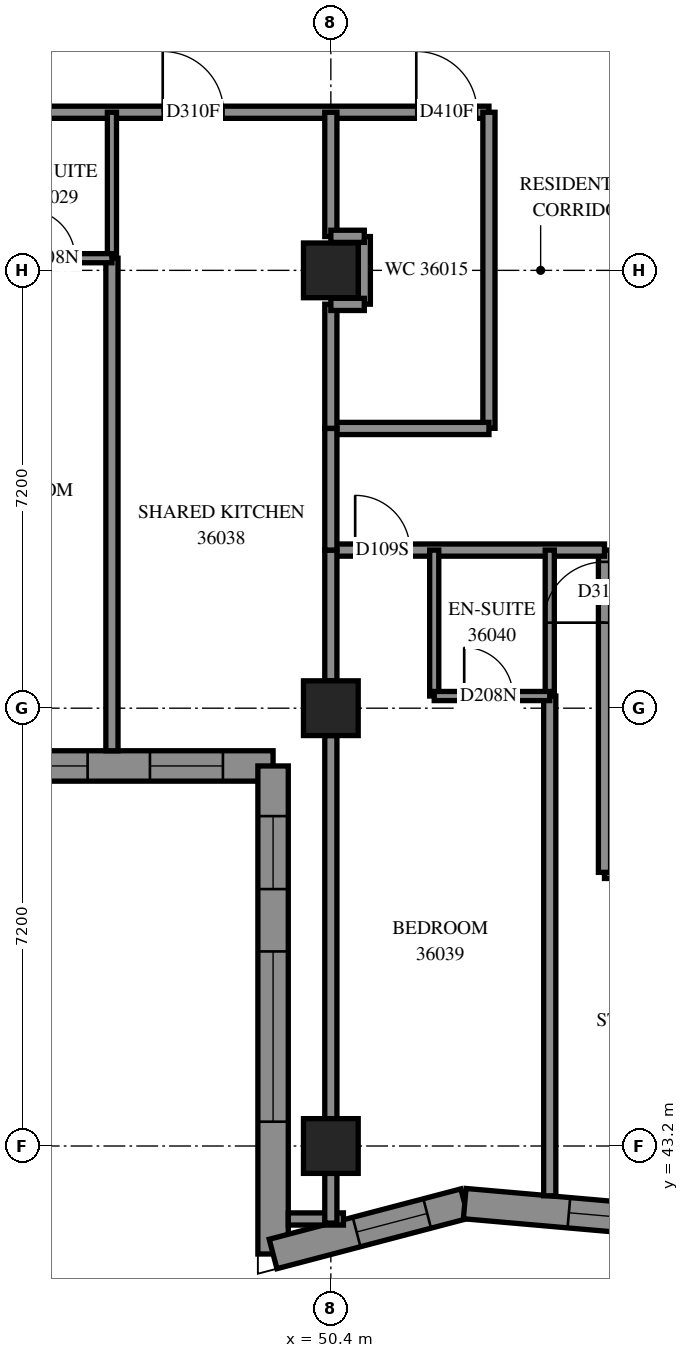
"""IFC4 building model, lengths in metres.
Left out: names, types, materials, properties, quantities, classifications, styles, units other than length and angle.
Written with IfcOpenShell. Run it as: python <this file> out.ifc"""

import sys

from ifc_helpers import new_model, si_unit, direction, frame, frame_2d, origin, origin_2d, place, context, subcontext, project, spatial, polyline, rectangle, outline, extrude, element, fill, save


model = new_model("IFC4")
c1 = context("Model", 3, precision=1e-05, world=origin(), true_north=direction((0.0, 1.0)))
c2 = subcontext(c1, "Body", "Model", "MODEL_VIEW")
j1 = project(units=[si_unit("LENGTHUNIT", "METRE"), si_unit("PLANEANGLEUNIT", "RADIAN")], contexts=[c1])
p1 = place(None, origin())
s1 = spatial("IfcSite", under=j1, at=p1, CompositionType="ELEMENT")
p2 = place(p1, origin())
s2 = spatial("IfcBuilding", under=s1, at=p2, CompositionType="ELEMENT")
p3 = place(p2, frame((0.0, 0.0, 135.4)))
s3 = spatial("IfcBuildingStorey", under=s2, at=p3, CompositionType="ELEMENT", Elevation=135.4)
for number, where, z_axis, x_axis in (
    (1, (50.4, 43.2, 0.0), (0.0, 0.0, 1.0), (1.0, 0.0, 0.0)),
    (2, (50.4, 50.4, 0.0), (0.0, 0.0, 1.0), (1.0, 0.0, 0.0)),
    (3, (50.4, 57.6, 0.0), (0.0, 0.0, 1.0), (1.0, 0.0, 0.0)),
):
    element("IfcColumn", number, at=place(p3, frame(where, z_axis=z_axis, x_axis=x_axis)), inside=s3, PredefinedType="COLUMN", context=c2, shape_type="SweptSolid", body=[
        extrude(rectangle(XDim=0.9, YDim=0.9, at=origin_2d()), origin(), (0.0, 0.0, 1.0), 3.1),
    ])
p4 = place(p3, frame((42.25, 49.45, 0.0), z_axis=(0.0, 0.0, 1.0), x_axis=(1.0, 0.0, 0.0)))
e4 = element("IfcWall", 4, at=p4, inside=s3, PredefinedType="SOLIDWALL", context=c2, shape_type="SweptSolid", body=[
    extrude(outline(polyline([(-0.25, -0.25), (6.95, -0.25), (7.45, 0.25), (0.25, 0.25), (-0.25, -0.25)])), origin(), (0.0, 0.0, 1.0), 3.1),
])
p5 = place(p4, frame((1.35, 0.0, 0.45)))
e5 = element("IfcOpeningElement", 5, at=p5, cuts=e4, PredefinedType="OPENING", context=c2, shape_type="SweptSolid", body=[
    extrude(rectangle(XDim=2.8, YDim=2.5, at=frame_2d((1.4, 1.25))), frame((0.0, 0.26, 0.0), z_axis=(0.0, -1.0, 0.0), x_axis=(1.0, 0.0, 0.0)), (0.0, 0.0, 1.0), 0.52),
])
p6 = place(p4, frame((5.175, 0.0, 0.45)))
e6 = element("IfcOpeningElement", 6, at=p6, cuts=e4, PredefinedType="OPENING", context=c2, shape_type="SweptSolid", body=[
    extrude(rectangle(XDim=1.2, YDim=2.5, at=frame_2d((0.6, 1.25))), frame((0.0, 0.26, 0.0), z_axis=(0.0, -1.0, 0.0), x_axis=(1.0, 0.0, 0.0)), (0.0, 0.0, 1.0), 0.52),
])
p7 = place(p3, frame((49.45, 49.45, 0.0), z_axis=(0.0, 0.0, 1.0), x_axis=(0.0, -1.0, 0.0)))
e7 = element("IfcWall", 7, at=p7, inside=s3, PredefinedType="SOLIDWALL", context=c2, shape_type="SweptSolid", body=[
    extrude(outline(polyline([(0.25, -0.25), (8.35, -0.25), (7.702, 0.25), (-0.25, 0.25), (0.25, -0.25)])), origin(), (0.0, 0.0, 1.0), 3.1),
])
p8 = place(p7, frame((3.05, 0.0, 0.45)))
e8 = element("IfcOpeningElement", 8, at=p8, cuts=e7, PredefinedType="OPENING", context=c2, shape_type="SweptSolid", body=[
    extrude(rectangle(XDim=2.8, YDim=2.5, at=frame_2d((1.4, 1.25))), frame((0.0, 0.26, 0.0), z_axis=(0.0, -1.0, 0.0), x_axis=(1.0, 0.0, 0.0)), (0.0, 0.0, 1.0), 0.52),
])
p9 = place(p7, frame((0.825, 0.0, 0.45)))
e9 = element("IfcOpeningElement", 9, at=p9, cuts=e7, PredefinedType="OPENING", context=c2, shape_type="SweptSolid", body=[
    extrude(rectangle(XDim=1.2, YDim=2.5, at=frame_2d((0.6, 1.25))), frame((0.0, 0.26, 0.0), z_axis=(0.0, -1.0, 0.0), x_axis=(1.0, 0.0, 0.0)), (0.0, 0.0, 1.0), 0.52),
])
p10 = place(p3, frame((49.45, 41.424, 0.0), z_axis=(0.0, 0.0, 1.0), x_axis=(0.9671285787, 0.2542878531, 0.0)))
e10 = element("IfcWall", 10, at=p10, inside=s3, PredefinedType="SOLIDWALL", context=c2, shape_type="SweptSolid", body=[
    extrude(outline(polyline([(-0.324, -0.25), (3.215, -0.25), (3.302, 0.25), (0.324, 0.25), (-0.324, -0.25)])), origin(), (0.0, 0.0, 1.0), 3.1),
])
p11 = place(p10, frame((1.42, 0.0, 0.45)))
e11 = element("IfcOpeningElement", 11, at=p11, cuts=e10, PredefinedType="OPENING", context=c2, shape_type="SweptSolid", body=[
    extrude(rectangle(XDim=1.2, YDim=2.5, at=frame_2d((0.6, 1.25))), frame((0.0, 0.26, 0.0), z_axis=(0.0, -1.0, 0.0), x_axis=(1.0, 0.0, 0.0)), (0.0, 0.0, 1.0), 0.52),
])
p12 = place(p3, frame((52.601, 42.253, 0.0), z_axis=(0.0, 0.0, 1.0), x_axis=(0.9961832879, -0.0872860633, 0.0)))
e12 = element("IfcWall", 12, at=p12, inside=s3, PredefinedType="SOLIDWALL", context=c2, shape_type="SweptSolid", body=[
    extrude(outline(polyline([(0.043, -0.25), (3.479, -0.25), (3.436, 0.25), (-0.043, 0.25), (0.043, -0.25)])), origin(), (0.0, 0.0, 1.0), 3.1),
])
p13 = place(p12, frame((1.72, 0.0, 0.45)))
e13 = element("IfcOpeningElement", 13, at=p13, cuts=e12, PredefinedType="OPENING", context=c2, shape_type="SweptSolid", body=[
    extrude(rectangle(XDim=1.2, YDim=2.5, at=frame_2d((0.6, 1.25))), frame((0.0, 0.26, 0.0), z_axis=(0.0, -1.0, 0.0), x_axis=(1.0, 0.0, 0.0)), (0.0, 0.0, 1.0), 0.52),
])
p14 = place(p3, frame((54.9, 47.7, 0.0), z_axis=(0.0, 0.0, 1.0), x_axis=(1.0, 0.0, 0.0)))
e14 = element("IfcWall", 14, at=p14, inside=s3, PredefinedType="PARTITIONING", context=c2, shape_type="SweptSolid", body=[
    extrude(rectangle(XDim=19.326, YDim=0.2, at=frame_2d((9.663, 0.0))), origin(), (0.0, 0.0, 1.0), 3.1),
])
p15 = place(p14, frame((5.0, 0.0, 0.0)))
e15 = element("IfcOpeningElement", 15, at=p15, cuts=e14, PredefinedType="OPENING", context=c2, shape_type="SweptSolid", body=[
    extrude(rectangle(XDim=0.9, YDim=2.1, at=frame_2d((0.45, 1.05))), frame((0.0, 0.11, 0.0), z_axis=(0.0, -1.0, 0.0), x_axis=(1.0, 0.0, 0.0)), (0.0, 0.0, 1.0), 0.22),
])
p16 = place(p14, frame((12.2, 0.0, 0.0)))
e16 = element("IfcOpeningElement", 16, at=p16, cuts=e14, PredefinedType="OPENING", context=c2, shape_type="SweptSolid", body=[
    extrude(rectangle(XDim=0.9, YDim=2.1, at=frame_2d((0.45, 1.05))), frame((0.0, 0.11, 0.0), z_axis=(0.0, -1.0, 0.0), x_axis=(1.0, 0.0, 0.0)), (0.0, 0.0, 1.0), 0.22),
])
p17 = place(p14, frame((6.7, 0.0, 0.0)))
e17 = element("IfcOpeningElement", 17, at=p17, cuts=e14, PredefinedType="OPENING", context=c2, shape_type="SweptSolid", body=[
    extrude(rectangle(XDim=0.9, YDim=2.1, at=frame_2d((0.45, 1.05))), frame((0.0, 0.11, 0.0), z_axis=(0.0, -1.0, 0.0), x_axis=(1.0, 0.0, 0.0)), (0.0, 0.0, 1.0), 0.22),
])
p18 = place(p14, frame((13.9, 0.0, 0.0)))
e18 = element("IfcOpeningElement", 18, at=p18, cuts=e14, PredefinedType="OPENING", context=c2, shape_type="SweptSolid", body=[
    extrude(rectangle(XDim=0.9, YDim=2.1, at=frame_2d((0.45, 1.05))), frame((0.0, 0.11, 0.0), z_axis=(0.0, -1.0, 0.0), x_axis=(1.0, 0.0, 0.0)), (0.0, 0.0, 1.0), 0.22),
])
p19 = place(p3, frame((36.0, 60.2, 0.0), z_axis=(0.0, 0.0, 1.0), x_axis=(1.0, 0.0, 0.0)))
e19 = element("IfcWall", 19, at=p19, inside=s3, PredefinedType="PARTITIONING", context=c2, shape_type="SweptSolid", body=[
    extrude(rectangle(XDim=17.0, YDim=0.2, at=frame_2d((8.5, 0.0))), origin(), (0.0, 0.0, 1.0), 3.1),
])
p20 = place(p19, frame((15.805, 0.0, 0.0)))
e20 = element("IfcOpeningElement", 20, at=p20, cuts=e19, PredefinedType="OPENING", context=c2, shape_type="SweptSolid", body=[
    extrude(rectangle(XDim=1.0, YDim=2.1, at=frame_2d((0.5, 1.05))), frame((0.0, 0.11, 0.0), z_axis=(0.0, -1.0, 0.0), x_axis=(1.0, 0.0, 0.0)), (0.0, 0.0, 1.0), 0.22),
])
p21 = place(p19, frame((4.125, 0.0, 0.0)))
e21 = element("IfcOpeningElement", 21, at=p21, cuts=e19, PredefinedType="OPENING", context=c2, shape_type="SweptSolid", body=[
    extrude(rectangle(XDim=1.0, YDim=2.1, at=frame_2d((0.5, 1.05))), frame((0.0, 0.11, 0.0), z_axis=(0.0, -1.0, 0.0), x_axis=(1.0, 0.0, 0.0)), (0.0, 0.0, 1.0), 0.22),
])
p22 = place(p19, frame((7.55, 0.0, 0.0)))
e22 = element("IfcOpeningElement", 22, at=p22, cuts=e19, PredefinedType="OPENING", context=c2, shape_type="SweptSolid", body=[
    extrude(rectangle(XDim=0.9, YDim=2.1, at=frame_2d((0.45, 1.05))), frame((0.0, 0.11, 0.0), z_axis=(0.0, -1.0, 0.0), x_axis=(1.0, 0.0, 0.0)), (0.0, 0.0, 1.0), 0.22),
])
p23 = place(p19, frame((11.635, 0.0, 0.0)))
e23 = element("IfcOpeningElement", 23, at=p23, cuts=e19, PredefinedType="OPENING", context=c2, shape_type="SweptSolid", body=[
    extrude(rectangle(XDim=1.0, YDim=2.1, at=frame_2d((0.5, 1.05))), frame((0.0, 0.11, 0.0), z_axis=(0.0, -1.0, 0.0), x_axis=(1.0, 0.0, 0.0)), (0.0, 0.0, 1.0), 0.22),
])
p24 = place(p3, frame((54.0, 42.381, 0.0), z_axis=(0.0, 0.0, 1.0), x_axis=(0.0, 1.0, 0.0)))
e24 = element("IfcWall", 24, at=p24, inside=s3, PredefinedType="PARTITIONING", context=c2, shape_type="SweptSolid", body=[
    extrude(rectangle(XDim=8.219, YDim=0.2, at=frame_2d((4.109, 0.0))), origin(), (0.0, 0.0, 1.0), 3.1),
])
p25 = place(p3, frame((46.8, 49.7, 0.0), z_axis=(0.0, 0.0, 1.0), x_axis=(0.0, 1.0, 0.0)))
e25 = element("IfcWall", 25, at=p25, inside=s3, PredefinedType="PARTITIONING", context=c2, shape_type="SweptSolid", body=[
    extrude(rectangle(XDim=8.1, YDim=0.2, at=frame_2d((4.05, 0.0))), origin(), (0.0, 0.0, 1.0), 3.1),
])
p26 = place(p3, frame((50.4, 43.65, 0.0), z_axis=(0.0, 0.0, 1.0), x_axis=(0.0, 1.0, 0.0)))
e26 = element("IfcWall", 26, at=p26, inside=s3, PredefinedType="PARTITIONING", context=c2, shape_type="SweptSolid", body=[
    extrude(rectangle(XDim=6.3, YDim=0.2, at=frame_2d((3.15, 0.0))), origin(), (0.0, 0.0, 1.0), 2.6),
])
p27 = place(p3, frame((54.9, 47.7, 0.0), z_axis=(0.0, 0.0, 1.0), x_axis=(0.0, 1.0, 0.0)))
e27 = element("IfcWall", 27, at=p27, inside=s3, PredefinedType="PARTITIONING", context=c2, shape_type="SweptSolid", body=[
    extrude(rectangle(XDim=5.3, YDim=0.2, at=frame_2d((2.65, 0.0))), origin(), (0.0, 0.0, 1.0), 3.1),
])
p28 = place(p27, frame((4.106, 0.0, 0.0)))
e28 = element("IfcOpeningElement", 28, at=p28, cuts=e27, PredefinedType="OPENING", context=c2, shape_type="SweptSolid", body=[
    extrude(rectangle(XDim=1.0, YDim=2.1, at=frame_2d((0.5, 1.05))), frame((0.0, 0.11, 0.0), z_axis=(0.0, -1.0, 0.0), x_axis=(1.0, 0.0, 0.0)), (0.0, 0.0, 1.0), 0.22),
])
p29 = place(p3, frame((53.0, 55.002, 0.0), z_axis=(0.0, 0.0, 1.0), x_axis=(0.0, 1.0, 0.0)))
e29 = element("IfcWall", 29, at=p29, inside=s3, PredefinedType="PARTITIONING", context=c2, shape_type="SweptSolid", body=[
    extrude(rectangle(XDim=5.198, YDim=0.2, at=frame_2d((2.599, 0.0))), origin(), (0.0, 0.0, 1.0), 3.1),
])
p30 = place(p3, frame((50.4, 53.0, 0.0), z_axis=(0.0, 0.0, 1.0), x_axis=(1.0, 0.0, 0.0)))
e30 = element("IfcWall", 30, at=p30, inside=s3, PredefinedType="PARTITIONING", context=c2, shape_type="SweptSolid", body=[
    extrude(rectangle(XDim=4.5, YDim=0.2, at=frame_2d((2.25, 0.0))), origin(), (0.0, 0.0, 1.0), 3.1),
])
p31 = place(p30, frame((0.4, 0.0, 0.0)))
e31 = element("IfcOpeningElement", 31, at=p31, cuts=e30, PredefinedType="OPENING", context=c2, shape_type="SweptSolid", body=[
    extrude(rectangle(XDim=0.9, YDim=2.1, at=frame_2d((0.45, 1.05))), frame((0.0, 0.11, 0.0), z_axis=(0.0, -1.0, 0.0), x_axis=(1.0, 0.0, 0.0)), (0.0, 0.0, 1.0), 0.22),
])
p32 = place(p3, frame((50.4, 55.0, 0.0), z_axis=(0.0, 0.0, 1.0), x_axis=(1.0, 0.0, 0.0)))
e32 = element("IfcWall", 32, at=p32, inside=s3, PredefinedType="PARTITIONING", context=c2, shape_type="SweptSolid", body=[
    extrude(rectangle(XDim=2.6, YDim=0.2, at=frame_2d((1.3, 0.0))), origin(), (0.0, 0.0, 1.0), 3.1),
])
for number, where, z_axis, x_axis in (
    (33, (46.8, 57.8, 0.0), (0.0, 0.0, 1.0), (0.0, 1.0, 0.0)),
    (34, (52.1, 50.6, 0.0), (0.0, 0.0, 1.0), (0.0, 1.0, 0.0)),
    (35, (54.0, 50.6, 0.0), (0.0, 0.0, 1.0), (0.0, 1.0, 0.0)),
):
    element("IfcWall", number, at=place(p3, frame(where, z_axis=z_axis, x_axis=x_axis)), inside=s3, PredefinedType="PARTITIONING", context=c2, shape_type="SweptSolid", body=[
        extrude(rectangle(XDim=2.4, YDim=0.15, at=frame_2d((1.2, 0.0))), origin(), (0.0, 0.0, 1.0), 3.1),
    ])
p33 = place(p3, frame((50.4, 50.85, 0.0), z_axis=(0.0, 0.0, 1.0), x_axis=(0.0, 1.0, 0.0)))
e36 = element("IfcWall", 36, at=p33, inside=s3, PredefinedType="PARTITIONING", context=c2, shape_type="SweptSolid", body=[
    extrude(rectangle(XDim=2.15, YDim=0.2, at=frame_2d((1.075, 0.0))), origin(), (0.0, 0.0, 1.0), 3.1),
])
for number, where, z_axis, x_axis in (
    (37, (50.4, 58.156, 0.0), (0.0, 0.0, 1.0), (0.0, 1.0, 0.0)),
    (38, (50.4, 55.0, 0.0), (0.0, 0.0, 1.0), (0.0, 1.0, 0.0)),
):
    element("IfcWall", number, at=place(p3, frame(where, z_axis=z_axis, x_axis=x_axis)), inside=s3, PredefinedType="PARTITIONING", context=c2, shape_type="SweptSolid", body=[
        extrude(rectangle(XDim=2.044, YDim=0.2, at=frame_2d((1.022, 0.0))), origin(), (0.0, 0.0, 1.0), 3.1),
    ])
p34 = place(p3, frame((50.4, 53.0, 0.0), z_axis=(0.0, 0.0, 1.0), x_axis=(0.0, 1.0, 0.0)))
e39 = element("IfcWall", 39, at=p34, inside=s3, PredefinedType="PARTITIONING", context=c2, shape_type="SweptSolid", body=[
    extrude(rectangle(XDim=2.0, YDim=0.2, at=frame_2d((1.0, 0.0))), origin(), (0.0, 0.0, 1.0), 3.1),
])
p35 = place(p3, frame((44.9, 57.8, 0.0), z_axis=(0.0, 0.0, 1.0), x_axis=(1.0, 0.0, 0.0)))
e40 = element("IfcWall", 40, at=p35, inside=s3, PredefinedType="PARTITIONING", context=c2, shape_type="SweptSolid", body=[
    extrude(rectangle(XDim=1.9, YDim=0.15, at=frame_2d((0.95, 0.0))), origin(), (0.0, 0.0, 1.0), 3.1),
])
p36 = place(p35, frame((0.493, 0.0, 0.0)))
e41 = element("IfcOpeningElement", 41, at=p36, cuts=e40, PredefinedType="OPENING", context=c2, shape_type="SweptSolid", body=[
    extrude(rectangle(XDim=0.8, YDim=2.1, at=frame_2d((0.4, 1.05))), frame((0.0, 0.085, 0.0), z_axis=(0.0, -1.0, 0.0), x_axis=(1.0, 0.0, 0.0)), (0.0, 0.0, 1.0), 0.17),
])
p37 = place(p3, frame((52.1, 50.6, 0.0), z_axis=(0.0, 0.0, 1.0), x_axis=(1.0, 0.0, 0.0)))
e42 = element("IfcWall", 42, at=p37, inside=s3, PredefinedType="PARTITIONING", context=c2, shape_type="SweptSolid", body=[
    extrude(rectangle(XDim=1.9, YDim=0.15, at=frame_2d((0.95, 0.0))), origin(), (0.0, 0.0, 1.0), 3.1),
])
p38 = place(p37, frame((0.493, 0.0, 0.0)))
e43 = element("IfcOpeningElement", 43, at=p38, cuts=e42, PredefinedType="OPENING", context=c2, shape_type="SweptSolid", body=[
    extrude(rectangle(XDim=0.8, YDim=2.1, at=frame_2d((0.4, 1.05))), frame((0.0, 0.085, 0.0), z_axis=(0.0, -1.0, 0.0), x_axis=(1.0, 0.0, 0.0)), (0.0, 0.0, 1.0), 0.17),
])
p39 = place(p3, frame((50.95, 57.044, 0.0), z_axis=(0.0, 0.0, 1.0), x_axis=(0.0, 1.0, 0.0)))
e44 = element("IfcWall", 44, at=p39, inside=s3, PredefinedType="PARTITIONING", context=c2, shape_type="SweptSolid", body=[
    extrude(rectangle(XDim=1.112, YDim=0.2, at=frame_2d((0.556, 0.0))), origin(), (0.0, 0.0, 1.0), 3.1),
])
p40 = place(p3, frame((49.7, 42.0, 0.0), z_axis=(0.0, 0.0, 1.0), x_axis=(1.0, 0.0, 0.0)))
e45 = element("IfcWall", 45, at=p40, inside=s3, PredefinedType="PARTITIONING", context=c2, shape_type="SweptSolid", body=[
    extrude(rectangle(XDim=0.907, YDim=0.2, at=frame_2d((0.453, 0.0))), origin(), (0.0, 0.0, 1.0), 3.1),
])
p41 = place(p3, frame((50.4, 41.932, 0.0), z_axis=(0.0, 0.0, 1.0), x_axis=(0.0, 1.0, 0.0)))
e46 = element("IfcWall", 46, at=p41, inside=s3, PredefinedType="PARTITIONING", context=c2, shape_type="SweptSolid", body=[
    extrude(rectangle(XDim=0.818, YDim=0.2, at=frame_2d((0.409, 0.0))), origin(), (0.0, 0.0, 1.0), 3.1),
])
for number, where, z_axis, x_axis in (
    (47, (50.4, 57.04, 0.0), (0.0, 0.0, 1.0), (1.0, 0.0, 0.0)),
    (48, (50.4, 58.16, 0.0), (0.0, 0.0, 1.0), (1.0, 0.0, 0.0)),
):
    element("IfcWall", number, at=place(p3, frame(where, z_axis=z_axis, x_axis=x_axis)), inside=s3, PredefinedType="PARTITIONING", context=c2, shape_type="SweptSolid", body=[
        extrude(rectangle(XDim=0.55, YDim=0.2, at=frame_2d((0.275, 0.0))), origin(), (0.0, 0.0, 1.0), 3.1),
    ])
p42 = place(p5, origin())
e49 = element("IfcWindow", 49, at=p42, inside=s3, PartitioningType="SINGLE_PANEL", PredefinedType="WINDOW", context=c2, shape_type="SweptSolid", body=[
    extrude(rectangle(XDim=2.8, YDim=2.5, at=frame_2d((1.4, 1.25))), frame((0.0, 0.18, 0.0), z_axis=(0.0, -1.0, 0.0), x_axis=(1.0, 0.0, 0.0)), (0.0, 0.0, 1.0), 0.06),
])
fill(e5, e49)
p43 = place(p6, origin())
e50 = element("IfcWindow", 50, at=p43, inside=s3, PartitioningType="SINGLE_PANEL", PredefinedType="WINDOW", context=c2, shape_type="SweptSolid", body=[
    extrude(rectangle(XDim=1.2, YDim=2.5, at=frame_2d((0.6, 1.25))), frame((0.0, 0.18, 0.0), z_axis=(0.0, -1.0, 0.0), x_axis=(1.0, 0.0, 0.0)), (0.0, 0.0, 1.0), 0.06),
])
fill(e6, e50)
p44 = place(p8, origin())
e51 = element("IfcWindow", 51, at=p44, inside=s3, PartitioningType="SINGLE_PANEL", PredefinedType="WINDOW", context=c2, shape_type="SweptSolid", body=[
    extrude(rectangle(XDim=2.8, YDim=2.5, at=frame_2d((1.4, 1.25))), frame((0.0, 0.18, 0.0), z_axis=(0.0, -1.0, 0.0), x_axis=(1.0, 0.0, 0.0)), (0.0, 0.0, 1.0), 0.06),
])
fill(e8, e51)
p45 = place(p9, origin())
e52 = element("IfcWindow", 52, at=p45, inside=s3, PartitioningType="SINGLE_PANEL", PredefinedType="WINDOW", context=c2, shape_type="SweptSolid", body=[
    extrude(rectangle(XDim=1.2, YDim=2.5, at=frame_2d((0.6, 1.25))), frame((0.0, 0.18, 0.0), z_axis=(0.0, -1.0, 0.0), x_axis=(1.0, 0.0, 0.0)), (0.0, 0.0, 1.0), 0.06),
])
fill(e9, e52)
p46 = place(p11, origin())
e53 = element("IfcWindow", 53, at=p46, inside=s3, PartitioningType="SINGLE_PANEL", PredefinedType="WINDOW", context=c2, shape_type="SweptSolid", body=[
    extrude(rectangle(XDim=1.2, YDim=2.5, at=frame_2d((0.6, 1.25))), frame((0.0, 0.18, 0.0), z_axis=(0.0, -1.0, 0.0), x_axis=(1.0, 0.0, 0.0)), (0.0, 0.0, 1.0), 0.06),
])
fill(e11, e53)
p47 = place(p13, origin())
e54 = element("IfcWindow", 54, at=p47, inside=s3, PartitioningType="SINGLE_PANEL", PredefinedType="WINDOW", context=c2, shape_type="SweptSolid", body=[
    extrude(rectangle(XDim=1.2, YDim=2.5, at=frame_2d((0.6, 1.25))), frame((0.0, 0.18, 0.0), z_axis=(0.0, -1.0, 0.0), x_axis=(1.0, 0.0, 0.0)), (0.0, 0.0, 1.0), 0.06),
])
fill(e13, e54)
p48 = place(p20, origin())
e55 = element("IfcDoor", 55, at=p48, inside=s3, OperationType="SINGLE_SWING_LEFT", PredefinedType="DOOR", context=c2, shape_type="SweptSolid", body=[
    extrude(rectangle(XDim=1.0, YDim=2.1, at=frame_2d((0.5, 1.05))), frame((0.0, 0.025, 0.0), z_axis=(0.0, -1.0, 0.0), x_axis=(1.0, 0.0, 0.0)), (0.0, 0.0, 1.0), 0.05),
])
fill(e20, e55)
p49 = place(p36, origin())
e56 = element("IfcDoor", 56, at=p49, inside=s3, OperationType="SINGLE_SWING_RIGHT", PredefinedType="DOOR", context=c2, shape_type="SweptSolid", body=[
    extrude(rectangle(XDim=0.8, YDim=2.1, at=frame_2d((0.4, 1.05))), frame((0.0, 0.025, 0.0), z_axis=(0.0, -1.0, 0.0), x_axis=(1.0, 0.0, 0.0)), (0.0, 0.0, 1.0), 0.05),
])
fill(e41, e56)
p50 = place(p23, origin())
e57 = element("IfcDoor", 57, at=p50, inside=s3, OperationType="SINGLE_SWING_RIGHT", PredefinedType="DOOR", context=c2, shape_type="SweptSolid", body=[
    extrude(rectangle(XDim=1.0, YDim=2.1, at=frame_2d((0.5, 1.05))), frame((0.0, 0.025, 0.0), z_axis=(0.0, -1.0, 0.0), x_axis=(1.0, 0.0, 0.0)), (0.0, 0.0, 1.0), 0.05),
])
fill(e23, e57)
p51 = place(p31, origin())
e58 = element("IfcDoor", 58, at=p51, inside=s3, OperationType="SINGLE_SWING_LEFT", PredefinedType="DOOR", context=c2, shape_type="SweptSolid", body=[
    extrude(rectangle(XDim=0.9, YDim=2.1, at=frame_2d((0.45, 1.05))), frame((0.0, 0.025, 0.0), z_axis=(0.0, -1.0, 0.0), x_axis=(1.0, 0.0, 0.0)), (0.0, 0.0, 1.0), 0.05),
])
fill(e31, e58)
p52 = place(p38, origin())
e59 = element("IfcDoor", 59, at=p52, inside=s3, OperationType="SINGLE_SWING_RIGHT", PredefinedType="DOOR", context=c2, shape_type="SweptSolid", body=[
    extrude(rectangle(XDim=0.8, YDim=2.1, at=frame_2d((0.4, 1.05))), frame((0.0, 0.025, 0.0), z_axis=(0.0, -1.0, 0.0), x_axis=(1.0, 0.0, 0.0)), (0.0, 0.0, 1.0), 0.05),
])
fill(e43, e59)
p53 = place(p28, origin())
e60 = element("IfcDoor", 60, at=p53, inside=s3, OperationType="SINGLE_SWING_RIGHT", PredefinedType="DOOR", context=c2, shape_type="SweptSolid", body=[
    extrude(rectangle(XDim=1.0, YDim=2.1, at=frame_2d((0.5, 1.05))), frame((0.0, 0.025, 0.0), z_axis=(0.0, -1.0, 0.0), x_axis=(1.0, 0.0, 0.0)), (0.0, 0.0, 1.0), 0.05),
])
fill(e28, e60)
save(model, sys.argv[1])
